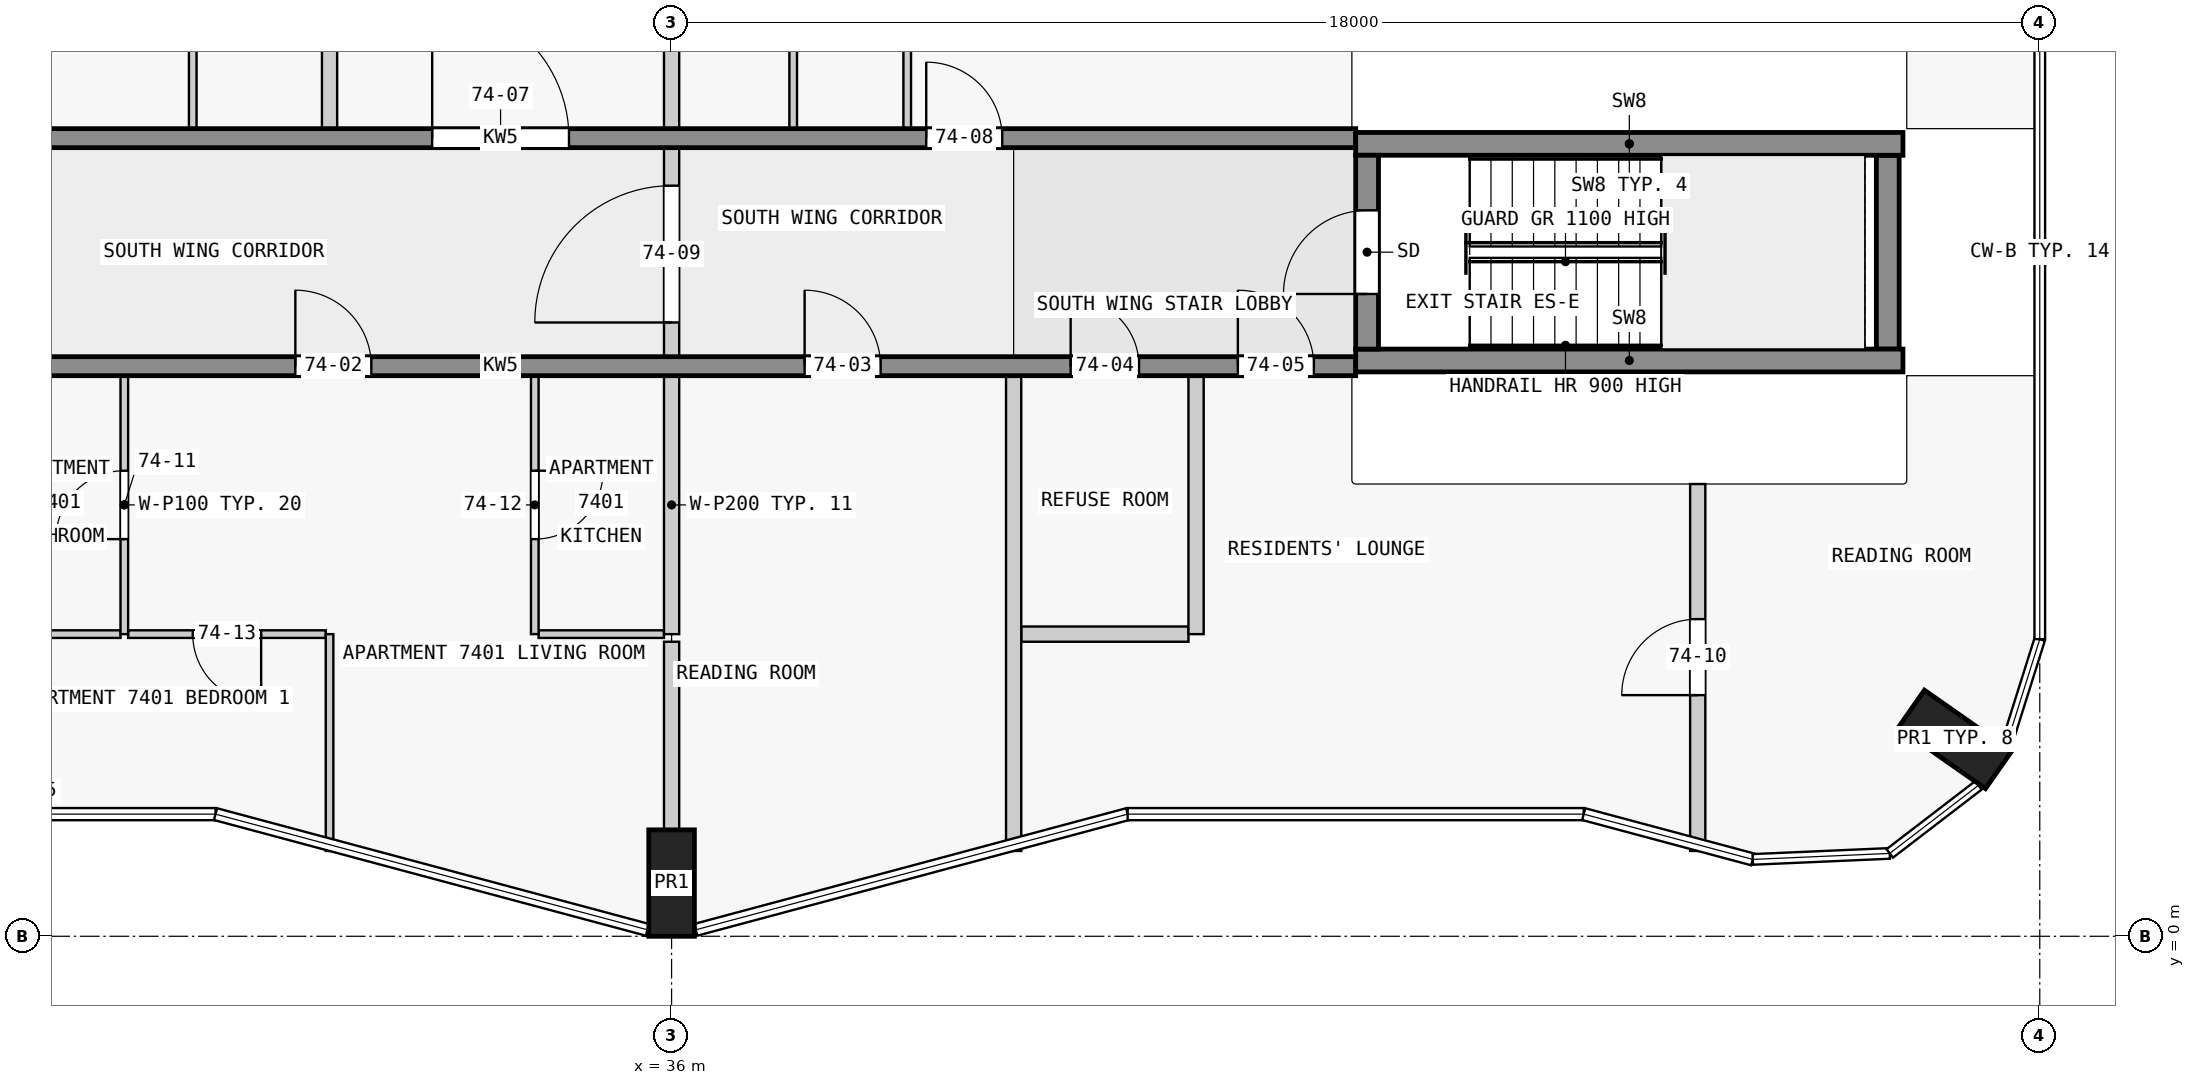
"""IFC4 building model, lengths in metres.
Left out: names, types, materials, properties, quantities, classifications, styles, units other than length and angle.
Written with IfcOpenShell. Run it as: python <this file> out.ifc"""

import sys

from ifc_helpers import new_model, si_unit, direction, frame, frame_2d, origin, origin_2d, place, context, subcontext, project, spatial, rectangle, extrude, element, fill, save


model = new_model("IFC4")
c1 = context("Model", 3, precision=1e-05, world=origin(), true_north=direction((0.0, 1.0)))
c2 = subcontext(c1, "Body", "Model", "MODEL_VIEW")
j1 = project(units=[si_unit("LENGTHUNIT", "METRE"), si_unit("PLANEANGLEUNIT", "RADIAN")], contexts=[c1])
p1 = place(None, origin())
s1 = spatial("IfcSite", under=j1, at=p1, CompositionType="ELEMENT")
p2 = place(p1, origin())
s2 = spatial("IfcBuilding", under=s1, at=p2, CompositionType="ELEMENT")
p3 = place(p2, frame((0.0, 0.0, 280.9)))
s3 = spatial("IfcBuildingStorey", under=s2, at=p3, CompositionType="ELEMENT", Elevation=280.9)
for number, where, z_axis, x_axis in (
    (1, (36.0, 0.7, 0.0), (0.0, 0.0, 1.0), (1.0, 0.0, 0.0)),
    (2, (52.884, 2.59, 0.0), (0.0, 0.0, 1.0), (0.574, 0.819, 0.0)),
):
    element("IfcColumn", number, at=place(p3, frame(where, z_axis=z_axis, x_axis=x_axis)), inside=s3, PredefinedType="COLUMN", context=c2, shape_type="SweptSolid", body=[
        extrude(rectangle(XDim=0.6, YDim=1.4, at=origin_2d()), origin(), (0.0, 0.0, 1.0), 3.5),
    ])
p4 = place(p3, frame((45.15, 7.725, 0.0), z_axis=(0.0, 0.0, 1.0), x_axis=(0.0, 1.0, 0.0)))
e3 = element("IfcWall", 3, at=p4, inside=s3, PredefinedType="SHEAR", context=c2, shape_type="SweptSolid", body=[
    extrude(rectangle(XDim=2.55, YDim=0.3, at=frame_2d((1.275, 0.0))), origin(), (0.0, 0.0, 1.0), 3.5),
])
p5 = place(p4, frame((0.725, 0.0, 0.0)))
e4 = element("IfcOpeningElement", 4, at=p5, cuts=e3, PredefinedType="OPENING", context=c2, shape_type="SweptSolid", body=[
    extrude(rectangle(XDim=1.1, YDim=2.1, at=frame_2d((0.55, 1.05))), frame((0.0, 0.16, 0.0), z_axis=(0.0, -1.0, 0.0), x_axis=(1.0, 0.0, 0.0)), (0.0, 0.0, 1.0), 0.32),
])
p6 = place(p3, frame((52.0, 7.725, 0.0), z_axis=(0.0, 0.0, 1.0), x_axis=(0.0, 1.0, 0.0)))
e5 = element("IfcWall", 5, at=p6, inside=s3, PredefinedType="SHEAR", context=c2, shape_type="SweptSolid", body=[
    extrude(rectangle(XDim=2.55, YDim=0.3, at=frame_2d((1.275, 0.0))), origin(), (0.0, 0.0, 1.0), 3.5),
])
for number, where, z_axis, x_axis in (
    (6, (45.0, 7.575, 0.0), (0.0, 0.0, 1.0), (1.0, 0.0, 0.0)),
    (7, (45.0, 10.425, 0.0), (0.0, 0.0, 1.0), (1.0, 0.0, 0.0)),
):
    element("IfcWall", number, at=place(p3, frame(where, z_axis=z_axis, x_axis=x_axis)), inside=s3, PredefinedType="SHEAR", context=c2, shape_type="SweptSolid", body=[
        extrude(rectangle(XDim=7.2, YDim=0.3, at=frame_2d((3.6, 0.0))), origin(), (0.0, 0.0, 1.0), 3.5),
    ])
p7 = place(p3, frame((22.5, 7.5, 0.0), z_axis=(0.0, 0.0, 1.0), x_axis=(1.0, 0.0, 0.0)))
e8 = element("IfcWall", 8, at=p7, inside=s3, PredefinedType="SHEAR", context=c2, shape_type="SweptSolid", body=[
    extrude(rectangle(XDim=22.5, YDim=0.25, at=frame_2d((11.25, 0.0))), origin(), (0.0, 0.0, 1.0), 3.25),
])
p8 = place(p7, frame((1.75, 0.0, 0.0)))
e9 = element("IfcOpeningElement", 9, at=p8, cuts=e8, PredefinedType="OPENING", context=c2, shape_type="SweptSolid", body=[
    extrude(rectangle(XDim=1.0, YDim=2.1, at=frame_2d((0.5, 1.05))), frame((0.0, 0.135, 0.0), z_axis=(0.0, -1.0, 0.0), x_axis=(1.0, 0.0, 0.0)), (0.0, 0.0, 1.0), 0.27),
])
p9 = place(p7, frame((8.55, 0.0, 0.0)))
e10 = element("IfcOpeningElement", 10, at=p9, cuts=e8, PredefinedType="OPENING", context=c2, shape_type="SweptSolid", body=[
    extrude(rectangle(XDim=1.0, YDim=2.1, at=frame_2d((0.5, 1.05))), frame((0.0, 0.135, 0.0), z_axis=(0.0, -1.0, 0.0), x_axis=(1.0, 0.0, 0.0)), (0.0, 0.0, 1.0), 0.27),
])
p10 = place(p7, frame((15.25, 0.0, 0.0)))
e11 = element("IfcOpeningElement", 11, at=p10, cuts=e8, PredefinedType="OPENING", context=c2, shape_type="SweptSolid", body=[
    extrude(rectangle(XDim=1.0, YDim=2.1, at=frame_2d((0.5, 1.05))), frame((0.0, 0.135, 0.0), z_axis=(0.0, -1.0, 0.0), x_axis=(1.0, 0.0, 0.0)), (0.0, 0.0, 1.0), 0.27),
])
p11 = place(p7, frame((18.75, 0.0, 0.0)))
e12 = element("IfcOpeningElement", 12, at=p11, cuts=e8, PredefinedType="OPENING", context=c2, shape_type="SweptSolid", body=[
    extrude(rectangle(XDim=0.9, YDim=2.1, at=frame_2d((0.45, 1.05))), frame((0.0, 0.135, 0.0), z_axis=(0.0, -1.0, 0.0), x_axis=(1.0, 0.0, 0.0)), (0.0, 0.0, 1.0), 0.27),
])
p12 = place(p7, frame((20.95, 0.0, 0.0)))
e13 = element("IfcOpeningElement", 13, at=p12, cuts=e8, PredefinedType="OPENING", context=c2, shape_type="SweptSolid", body=[
    extrude(rectangle(XDim=1.0, YDim=2.1, at=frame_2d((0.5, 1.05))), frame((0.0, 0.135, 0.0), z_axis=(0.0, -1.0, 0.0), x_axis=(1.0, 0.0, 0.0)), (0.0, 0.0, 1.0), 0.27),
])
p13 = place(p3, frame((22.5, 10.5, 0.0), z_axis=(0.0, 0.0, 1.0), x_axis=(1.0, 0.0, 0.0)))
e14 = element("IfcWall", 14, at=p13, inside=s3, PredefinedType="SHEAR", context=c2, shape_type="SweptSolid", body=[
    extrude(rectangle(XDim=22.5, YDim=0.25, at=frame_2d((11.25, 0.0))), origin(), (0.0, 0.0, 1.0), 3.25),
])
p14 = place(p13, frame((4.05, 0.0, 0.0)))
e15 = element("IfcOpeningElement", 15, at=p14, cuts=e14, PredefinedType="OPENING", context=c2, shape_type="SweptSolid", body=[
    extrude(rectangle(XDim=1.0, YDim=2.1, at=frame_2d((0.5, 1.05))), frame((0.0, 0.135, 0.0), z_axis=(0.0, -1.0, 0.0), x_axis=(1.0, 0.0, 0.0)), (0.0, 0.0, 1.0), 0.27),
])
p15 = place(p13, frame((10.35, 0.0, 0.0)))
e16 = element("IfcOpeningElement", 16, at=p15, cuts=e14, PredefinedType="OPENING", context=c2, shape_type="SweptSolid", body=[
    extrude(rectangle(XDim=1.8, YDim=2.1, at=frame_2d((0.9, 1.05))), frame((0.0, 0.135, 0.0), z_axis=(0.0, -1.0, 0.0), x_axis=(1.0, 0.0, 0.0)), (0.0, 0.0, 1.0), 0.27),
])
p16 = place(p13, frame((16.85, 0.0, 0.0)))
e17 = element("IfcOpeningElement", 17, at=p16, cuts=e14, PredefinedType="OPENING", context=c2, shape_type="SweptSolid", body=[
    extrude(rectangle(XDim=1.0, YDim=2.1, at=frame_2d((0.5, 1.05))), frame((0.0, 0.135, 0.0), z_axis=(0.0, -1.0, 0.0), x_axis=(1.0, 0.0, 0.0)), (0.0, 0.0, 1.0), 0.27),
])
p17 = place(p3, frame((31.45, 3.975, 0.0), z_axis=(0.0, 0.0, 1.0), x_axis=(-1.0, 0.0, 0.0)))
e18 = element("IfcWall", 18, at=p17, inside=s3, PredefinedType="PARTITIONING", context=c2, shape_type="SweptSolid", body=[
    extrude(rectangle(XDim=2.6, YDim=0.1, at=frame_2d((1.3, 0.0))), origin(), (0.0, 0.0, 1.0), 3.25),
])
p18 = place(p17, frame((0.85, 0.0, 0.0)))
e19 = element("IfcOpeningElement", 19, at=p18, cuts=e18, PredefinedType="OPENING", context=c2, shape_type="SweptSolid", body=[
    extrude(rectangle(XDim=0.9, YDim=2.1, at=frame_2d((0.45, 1.05))), frame((0.0, 0.06, 0.0), z_axis=(0.0, -1.0, 0.0), x_axis=(1.0, 0.0, 0.0)), (0.0, 0.0, 1.0), 0.12),
])
for number, where, z_axis, x_axis in (
    (20, (27.1, 3.975, 0.0), (0.0, 0.0, 1.0), (1.0, 0.0, 0.0)),
    (21, (34.25, 3.975, 0.0), (0.0, 0.0, 1.0), (1.0, 0.0, 0.0)),
):
    element("IfcWall", number, at=place(p3, frame(where, z_axis=z_axis, x_axis=x_axis)), inside=s3, PredefinedType="PARTITIONING", context=c2, shape_type="SweptSolid", body=[
        extrude(rectangle(XDim=1.65, YDim=0.1, at=frame_2d((0.825, 0.0))), origin(), (0.0, 0.0, 1.0), 3.25),
    ])
p19 = place(p3, frame((40.6, 3.975, 0.0), z_axis=(0.0, 0.0, 1.0), x_axis=(1.0, 0.0, 0.0)))
e22 = element("IfcWall", 22, at=p19, inside=s3, PredefinedType="PARTITIONING", context=c2, shape_type="SweptSolid", body=[
    extrude(rectangle(XDim=2.2, YDim=0.2, at=frame_2d((1.1, 0.0))), origin(), (0.0, 0.0, 1.0), 3.25),
])
p20 = place(p3, frame((28.8, 3.975, 0.0), z_axis=(0.0, 0.0, 1.0), x_axis=(0.0, 1.0, 0.0)))
e23 = element("IfcWall", 23, at=p20, inside=s3, PredefinedType="PARTITIONING", context=c2, shape_type="SweptSolid", body=[
    extrude(rectangle(XDim=3.4, YDim=0.1, at=frame_2d((1.7, 0.0))), origin(), (0.0, 0.0, 1.0), 3.25),
])
p21 = place(p20, frame((1.25, 0.0, 0.0)))
e24 = element("IfcOpeningElement", 24, at=p21, cuts=e23, PredefinedType="OPENING", context=c2, shape_type="SweptSolid", body=[
    extrude(rectangle(XDim=0.9, YDim=2.1, at=frame_2d((0.45, 1.05))), frame((0.0, 0.06, 0.0), z_axis=(0.0, -1.0, 0.0), x_axis=(1.0, 0.0, 0.0)), (0.0, 0.0, 1.0), 0.12),
])
p22 = place(p3, frame((29.7, 14.025, 0.0), z_axis=(0.0, 0.0, 1.0), x_axis=(0.0, -1.0, 0.0)))
e25 = element("IfcWall", 25, at=p22, inside=s3, PredefinedType="PARTITIONING", context=c2, shape_type="SweptSolid", body=[
    extrude(rectangle(XDim=3.4, YDim=0.1, at=frame_2d((1.7, 0.0))), origin(), (0.0, 0.0, 1.0), 3.25),
])
p23 = place(p22, frame((1.25, 0.0, 0.0)))
e26 = element("IfcOpeningElement", 26, at=p23, cuts=e25, PredefinedType="OPENING", context=c2, shape_type="SweptSolid", body=[
    extrude(rectangle(XDim=0.9, YDim=2.1, at=frame_2d((0.45, 1.05))), frame((0.0, 0.06, 0.0), z_axis=(0.0, -1.0, 0.0), x_axis=(1.0, 0.0, 0.0)), (0.0, 0.0, 1.0), 0.12),
])
p24 = place(p3, frame((31.5, 1.122, 0.0), z_axis=(0.0, 0.0, 1.0), x_axis=(0.0, 1.0, 0.0)))
e27 = element("IfcWall", 27, at=p24, inside=s3, PredefinedType="PARTITIONING", context=c2, shape_type="SweptSolid", body=[
    extrude(rectangle(XDim=2.853, YDim=0.1, at=frame_2d((1.426, 0.0))), origin(), (0.0, 0.0, 1.0), 3.25),
])
p25 = place(p3, frame((31.5, 10.625, 0.0), z_axis=(0.0, 0.0, 1.0), x_axis=(0.0, 1.0, 0.0)))
e28 = element("IfcWall", 28, at=p25, inside=s3, PredefinedType="PARTITIONING", context=c2, shape_type="SweptSolid", body=[
    extrude(rectangle(XDim=3.4, YDim=0.2, at=frame_2d((1.7, 0.0))), origin(), (0.0, 0.0, 1.0), 3.25),
])
p26 = place(p3, frame((34.2, 7.375, 0.0), z_axis=(0.0, 0.0, 1.0), x_axis=(0.0, -1.0, 0.0)))
e29 = element("IfcWall", 29, at=p26, inside=s3, PredefinedType="PARTITIONING", context=c2, shape_type="SweptSolid", body=[
    extrude(rectangle(XDim=3.4, YDim=0.1, at=frame_2d((1.7, 0.0))), origin(), (0.0, 0.0, 1.0), 3.25),
])
p27 = place(p26, frame((1.25, 0.0, 0.0)))
e30 = element("IfcOpeningElement", 30, at=p27, cuts=e29, PredefinedType="OPENING", context=c2, shape_type="SweptSolid", body=[
    extrude(rectangle(XDim=0.9, YDim=2.1, at=frame_2d((0.45, 1.05))), frame((0.0, 0.06, 0.0), z_axis=(0.0, -1.0, 0.0), x_axis=(1.0, 0.0, 0.0)), (0.0, 0.0, 1.0), 0.12),
])
p28 = place(p3, frame((36.0, 3.875, 0.0), z_axis=(0.0, 0.0, 1.0), x_axis=(0.0, -1.0, 0.0)))
e31 = element("IfcWall", 31, at=p28, inside=s3, PredefinedType="PARTITIONING", context=c2, shape_type="SweptSolid", body=[
    extrude(rectangle(XDim=2.475, YDim=0.2, at=frame_2d((1.238, 0.0))), origin(), (0.0, 0.0, 1.0), 3.25),
])
p29 = place(p3, frame((36.0, 3.975, 0.0), z_axis=(0.0, 0.0, 1.0), x_axis=(0.0, 1.0, 0.0)))
e32 = element("IfcWall", 32, at=p29, inside=s3, PredefinedType="PARTITIONING", context=c2, shape_type="SweptSolid", body=[
    extrude(rectangle(XDim=3.4, YDim=0.2, at=frame_2d((1.7, 0.0))), origin(), (0.0, 0.0, 1.0), 3.25),
])
p30 = place(p3, frame((36.0, 10.625, 0.0), z_axis=(0.0, 0.0, 1.0), x_axis=(0.0, 1.0, 0.0)))
e33 = element("IfcWall", 33, at=p30, inside=s3, PredefinedType="PARTITIONING", context=c2, shape_type="SweptSolid", body=[
    extrude(rectangle(XDim=5.975, YDim=0.2, at=frame_2d((2.988, 0.0))), origin(), (0.0, 0.0, 1.0), 3.25),
])
p31 = place(p3, frame((37.6, 10.625, 0.0), z_axis=(0.0, 0.0, 1.0), x_axis=(0.0, 1.0, 0.0)))
e34 = element("IfcWall", 34, at=p31, inside=s3, PredefinedType="PARTITIONING", context=c2, shape_type="SweptSolid", body=[
    extrude(rectangle(XDim=3.4, YDim=0.1, at=frame_2d((1.7, 0.0))), origin(), (0.0, 0.0, 1.0), 3.25),
])
p32 = place(p3, frame((39.1, 10.625, 0.0), z_axis=(0.0, 0.0, 1.0), x_axis=(0.0, 1.0, 0.0)))
e35 = element("IfcWall", 35, at=p32, inside=s3, PredefinedType="PARTITIONING", context=c2, shape_type="SweptSolid", body=[
    extrude(rectangle(XDim=3.4, YDim=0.1, at=frame_2d((1.7, 0.0))), origin(), (0.0, 0.0, 1.0), 3.25),
])
p33 = place(p32, frame((1.25, 0.0, 0.0)))
e36 = element("IfcOpeningElement", 36, at=p33, cuts=e35, PredefinedType="OPENING", context=c2, shape_type="SweptSolid", body=[
    extrude(rectangle(XDim=0.9, YDim=2.1, at=frame_2d((0.45, 1.05))), frame((0.0, 0.06, 0.0), z_axis=(0.0, -1.0, 0.0), x_axis=(1.0, 0.0, 0.0)), (0.0, 0.0, 1.0), 0.12),
])
p34 = place(p3, frame((40.5, 1.122, 0.0), z_axis=(0.0, 0.0, 1.0), x_axis=(0.0, 1.0, 0.0)))
e37 = element("IfcWall", 37, at=p34, inside=s3, PredefinedType="PARTITIONING", context=c2, shape_type="SweptSolid", body=[
    extrude(rectangle(XDim=6.253, YDim=0.2, at=frame_2d((3.126, 0.0))), origin(), (0.0, 0.0, 1.0), 3.25),
])
p35 = place(p3, frame((42.9, 3.975, 0.0), z_axis=(0.0, 0.0, 1.0), x_axis=(0.0, 1.0, 0.0)))
e38 = element("IfcWall", 38, at=p35, inside=s3, PredefinedType="PARTITIONING", context=c2, shape_type="SweptSolid", body=[
    extrude(rectangle(XDim=3.4, YDim=0.2, at=frame_2d((1.7, 0.0))), origin(), (0.0, 0.0, 1.0), 3.25),
])
p36 = place(p3, frame((49.5, 1.122, 0.0), z_axis=(0.0, 0.0, 1.0), x_axis=(0.0, 1.0, 0.0)))
e39 = element("IfcWall", 39, at=p36, inside=s3, PredefinedType="PARTITIONING", context=c2, shape_type="SweptSolid", body=[
    extrude(rectangle(XDim=4.828, YDim=0.2, at=frame_2d((2.414, 0.0))), origin(), (0.0, 0.0, 1.0), 3.25),
])
p37 = place(p36, frame((2.05, 0.0, 0.0)))
e40 = element("IfcOpeningElement", 40, at=p37, cuts=e39, PredefinedType="OPENING", context=c2, shape_type="SweptSolid", body=[
    extrude(rectangle(XDim=1.0, YDim=2.1, at=frame_2d((0.5, 1.05))), frame((0.0, 0.11, 0.0), z_axis=(0.0, -1.0, 0.0), x_axis=(1.0, 0.0, 0.0)), (0.0, 0.0, 1.0), 0.22),
])
p38 = place(p3, frame((36.0, 7.475, 0.0), z_axis=(0.0, 0.0, 1.0), x_axis=(0.0, 1.0, 0.0)))
e41 = element("IfcWall", 41, at=p38, inside=s3, PredefinedType="PARTITIONING", context=c2, shape_type="SweptSolid", body=[
    extrude(rectangle(XDim=3.05, YDim=0.2, at=frame_2d((1.525, 0.0))), origin(), (0.0, 0.0, 1.0), 3.25),
])
p39 = place(p38, frame((0.6, 0.0, 0.0)))
e42 = element("IfcOpeningElement", 42, at=p39, cuts=e41, PredefinedType="OPENING", context=c2, shape_type="SweptSolid", body=[
    extrude(rectangle(XDim=1.8, YDim=2.1, at=frame_2d((0.9, 1.05))), frame((0.0, 0.11, 0.0), z_axis=(0.0, -1.0, 0.0), x_axis=(1.0, 0.0, 0.0)), (0.0, 0.0, 1.0), 0.22),
])
p40 = place(p5, origin())
e43 = element("IfcDoor", 43, at=p40, inside=s3, OperationType="SINGLE_SWING_LEFT", PredefinedType="DOOR", context=c2, shape_type="SweptSolid", body=[
    extrude(rectangle(XDim=1.1, YDim=2.1, at=frame_2d((0.55, 1.05))), frame((0.0, 0.025, 0.0), z_axis=(0.0, -1.0, 0.0), x_axis=(1.0, 0.0, 0.0)), (0.0, 0.0, 1.0), 0.05),
])
fill(e4, e43)
p41 = place(p9, origin())
e44 = element("IfcDoor", 44, at=p41, inside=s3, OperationType="SINGLE_SWING_LEFT", PredefinedType="DOOR", context=c2, shape_type="SweptSolid", body=[
    extrude(rectangle(XDim=1.0, YDim=2.1, at=frame_2d((0.5, 1.05))), frame((0.0, 0.025, 0.0), z_axis=(0.0, -1.0, 0.0), x_axis=(1.0, 0.0, 0.0)), (0.0, 0.0, 1.0), 0.05),
])
fill(e10, e44)
p42 = place(p10, origin())
e45 = element("IfcDoor", 45, at=p42, inside=s3, OperationType="SINGLE_SWING_RIGHT", PredefinedType="DOOR", context=c2, shape_type="SweptSolid", body=[
    extrude(rectangle(XDim=1.0, YDim=2.1, at=frame_2d((0.5, 1.05))), frame((0.0, 0.025, 0.0), z_axis=(0.0, -1.0, 0.0), x_axis=(1.0, 0.0, 0.0)), (0.0, 0.0, 1.0), 0.05),
])
fill(e11, e45)
p43 = place(p11, origin())
e46 = element("IfcDoor", 46, at=p43, inside=s3, OperationType="SINGLE_SWING_RIGHT", PredefinedType="DOOR", context=c2, shape_type="SweptSolid", body=[
    extrude(rectangle(XDim=0.9, YDim=2.1, at=frame_2d((0.45, 1.05))), frame((0.0, 0.025, 0.0), z_axis=(0.0, -1.0, 0.0), x_axis=(1.0, 0.0, 0.0)), (0.0, 0.0, 1.0), 0.05),
])
fill(e12, e46)
p44 = place(p12, origin())
e47 = element("IfcDoor", 47, at=p44, inside=s3, OperationType="SINGLE_SWING_RIGHT", PredefinedType="DOOR", context=c2, shape_type="SweptSolid", body=[
    extrude(rectangle(XDim=1.0, YDim=2.1, at=frame_2d((0.5, 1.05))), frame((0.0, 0.025, 0.0), z_axis=(0.0, -1.0, 0.0), x_axis=(1.0, 0.0, 0.0)), (0.0, 0.0, 1.0), 0.05),
])
fill(e13, e47)
p45 = place(p15, origin())
e48 = element("IfcDoor", 48, at=p45, inside=s3, OperationType="SINGLE_SWING_LEFT", PredefinedType="DOOR", context=c2, shape_type="SweptSolid", body=[
    extrude(rectangle(XDim=1.8, YDim=2.1, at=frame_2d((0.9, 1.05))), frame((0.0, 0.025, 0.0), z_axis=(0.0, -1.0, 0.0), x_axis=(1.0, 0.0, 0.0)), (0.0, 0.0, 1.0), 0.05),
])
fill(e16, e48)
p46 = place(p16, origin())
e49 = element("IfcDoor", 49, at=p46, inside=s3, OperationType="SINGLE_SWING_RIGHT", PredefinedType="DOOR", context=c2, shape_type="SweptSolid", body=[
    extrude(rectangle(XDim=1.0, YDim=2.1, at=frame_2d((0.5, 1.05))), frame((0.0, 0.025, 0.0), z_axis=(0.0, -1.0, 0.0), x_axis=(1.0, 0.0, 0.0)), (0.0, 0.0, 1.0), 0.05),
])
fill(e17, e49)
p47 = place(p39, origin())
e50 = element("IfcDoor", 50, at=p47, inside=s3, OperationType="SINGLE_SWING_LEFT", PredefinedType="DOOR", context=c2, shape_type="SweptSolid", body=[
    extrude(rectangle(XDim=1.8, YDim=2.1, at=frame_2d((0.9, 1.05))), frame((0.0, 0.025, 0.0), z_axis=(0.0, -1.0, 0.0), x_axis=(1.0, 0.0, 0.0)), (0.0, 0.0, 1.0), 0.05),
])
fill(e42, e50)
p48 = place(p37, origin())
e51 = element("IfcDoor", 51, at=p48, inside=s3, OperationType="SINGLE_SWING_RIGHT", PredefinedType="DOOR", context=c2, shape_type="SweptSolid", body=[
    extrude(rectangle(XDim=1.0, YDim=2.1, at=frame_2d((0.5, 1.05))), frame((0.0, 0.025, 0.0), z_axis=(0.0, -1.0, 0.0), x_axis=(1.0, 0.0, 0.0)), (0.0, 0.0, 1.0), 0.05),
])
fill(e40, e51)
p49 = place(p21, origin())
e52 = element("IfcDoor", 52, at=p49, inside=s3, OperationType="SINGLE_SWING_LEFT", PredefinedType="DOOR", context=c2, shape_type="SweptSolid", body=[
    extrude(rectangle(XDim=0.9, YDim=2.1, at=frame_2d((0.45, 1.05))), frame((0.0, 0.025, 0.0), z_axis=(0.0, -1.0, 0.0), x_axis=(1.0, 0.0, 0.0)), (0.0, 0.0, 1.0), 0.05),
])
fill(e24, e52)
p50 = place(p27, origin())
e53 = element("IfcDoor", 53, at=p50, inside=s3, OperationType="SINGLE_SWING_LEFT", PredefinedType="DOOR", context=c2, shape_type="SweptSolid", body=[
    extrude(rectangle(XDim=0.9, YDim=2.1, at=frame_2d((0.45, 1.05))), frame((0.0, 0.025, 0.0), z_axis=(0.0, -1.0, 0.0), x_axis=(1.0, 0.0, 0.0)), (0.0, 0.0, 1.0), 0.05),
])
fill(e30, e53)
p51 = place(p18, origin())
e54 = element("IfcDoor", 54, at=p51, inside=s3, OperationType="SINGLE_SWING_RIGHT", PredefinedType="DOOR", context=c2, shape_type="SweptSolid", body=[
    extrude(rectangle(XDim=0.9, YDim=2.1, at=frame_2d((0.45, 1.05))), frame((0.0, 0.025, 0.0), z_axis=(0.0, -1.0, 0.0), x_axis=(1.0, 0.0, 0.0)), (0.0, 0.0, 1.0), 0.05),
])
fill(e19, e54)
save(model, sys.argv[1])
